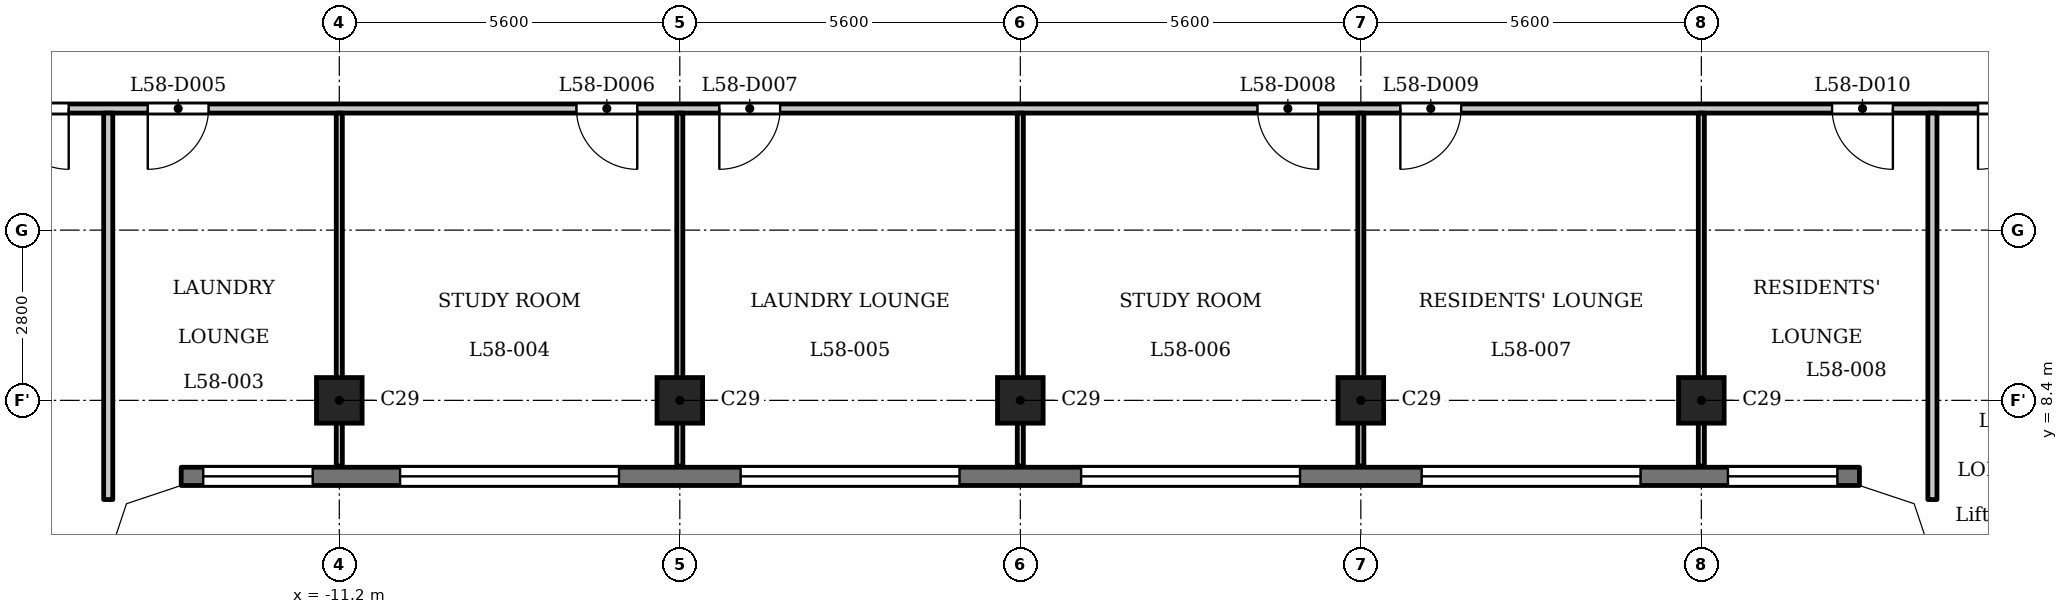
"""IFC4 building model, lengths in metres.
Left out: names, types, materials, properties, quantities, classifications, styles, units other than length and angle.
Written with IfcOpenShell. Run it as: python <this file> out.ifc"""

import sys

from ifc_helpers import new_model, si_unit, direction, frame, frame_2d, origin, origin_2d, place, context, subcontext, project, spatial, polyline, rectangle, outline, extrude, element, fill, save


model = new_model("IFC4")
c1 = context("Model", 3, precision=1e-05, world=origin(), true_north=direction((0.0, 1.0)))
c2 = subcontext(c1, "Body", "Model", "MODEL_VIEW")
j1 = project(units=[si_unit("LENGTHUNIT", "METRE"), si_unit("PLANEANGLEUNIT", "RADIAN")], contexts=[c1])
p1 = place(None, origin())
s1 = spatial("IfcSite", under=j1, at=p1, CompositionType="ELEMENT")
p2 = place(p1, origin())
s2 = spatial("IfcBuilding", under=s1, at=p2, CompositionType="ELEMENT")
p3 = place(p2, frame((0.0, 0.0, 223.9)))
s3 = spatial("IfcBuildingStorey", under=s2, at=p3, CompositionType="ELEMENT", Elevation=223.9)
for number, where, z_axis, x_axis in (
    (1, (-11.2, 8.4, 0.0), (0.0, 0.0, 1.0), (1.0, 0.0, 0.0)),
    (2, (-5.6, 8.4, 0.0), (0.0, 0.0, 1.0), (1.0, 0.0, 0.0)),
    (3, (0.0, 8.4, 0.0), (0.0, 0.0, 1.0), (1.0, 0.0, 0.0)),
    (4, (5.6, 8.4, 0.0), (0.0, 0.0, 1.0), (1.0, 0.0, 0.0)),
    (5, (11.2, 8.4, 0.0), (0.0, 0.0, 1.0), (1.0, 0.0, 0.0)),
):
    element("IfcColumn", number, at=place(p3, frame(where, z_axis=z_axis, x_axis=x_axis)), inside=s3, PredefinedType="COLUMN", context=c2, shape_type="SweptSolid", body=[
        extrude(rectangle(XDim=0.75, YDim=0.75, at=origin_2d()), origin(), (0.0, 0.0, 1.0), 3.5),
    ])
p4 = place(p3, frame((-13.8, 7.15, 0.0), z_axis=(0.0, 0.0, 1.0), x_axis=(1.0, 0.0, 0.0)))
e6 = element("IfcWall", 6, at=p4, inside=s3, PredefinedType="SOLIDWALL", context=c2, shape_type="SweptSolid", body=[
    extrude(rectangle(XDim=27.6, YDim=0.3, at=frame_2d((13.8, 0.0))), origin(), (0.0, 0.0, 1.0), 3.2),
])
p5 = place(p4, frame((0.363, 0.0, 0.9)))
e7 = element("IfcOpeningElement", 7, at=p5, cuts=e6, PredefinedType="OPENING", context=c2, shape_type="SweptSolid", body=[
    extrude(rectangle(XDim=1.8, YDim=1.25, at=frame_2d((0.9, 0.625))), frame((0.0, 0.16, 0.0), z_axis=(0.0, -1.0, 0.0), x_axis=(1.0, 0.0, 0.0)), (0.0, 0.0, 1.0), 0.32),
])
p6 = place(p4, frame((3.6, 0.0, 1.2)))
e8 = element("IfcOpeningElement", 8, at=p6, cuts=e6, PredefinedType="OPENING", context=c2, shape_type="SweptSolid", body=[
    extrude(rectangle(XDim=3.6, YDim=0.95, at=frame_2d((1.8, 0.475))), frame((0.0, 0.16, 0.0), z_axis=(0.0, -1.0, 0.0), x_axis=(1.0, 0.0, 0.0)), (0.0, 0.0, 1.0), 0.32),
])
p7 = place(p4, frame((9.2, 0.0, 1.2)))
e9 = element("IfcOpeningElement", 9, at=p7, cuts=e6, PredefinedType="OPENING", context=c2, shape_type="SweptSolid", body=[
    extrude(rectangle(XDim=3.6, YDim=0.95, at=frame_2d((1.8, 0.475))), frame((0.0, 0.16, 0.0), z_axis=(0.0, -1.0, 0.0), x_axis=(1.0, 0.0, 0.0)), (0.0, 0.0, 1.0), 0.32),
])
p8 = place(p4, frame((14.8, 0.0, 1.2)))
e10 = element("IfcOpeningElement", 10, at=p8, cuts=e6, PredefinedType="OPENING", context=c2, shape_type="SweptSolid", body=[
    extrude(rectangle(XDim=3.6, YDim=0.95, at=frame_2d((1.8, 0.475))), frame((0.0, 0.16, 0.0), z_axis=(0.0, -1.0, 0.0), x_axis=(1.0, 0.0, 0.0)), (0.0, 0.0, 1.0), 0.32),
])
p9 = place(p4, frame((20.4, 0.0, 1.2)))
e11 = element("IfcOpeningElement", 11, at=p9, cuts=e6, PredefinedType="OPENING", context=c2, shape_type="SweptSolid", body=[
    extrude(rectangle(XDim=3.6, YDim=0.95, at=frame_2d((1.8, 0.475))), frame((0.0, 0.16, 0.0), z_axis=(0.0, -1.0, 0.0), x_axis=(1.0, 0.0, 0.0)), (0.0, 0.0, 1.0), 0.32),
])
p10 = place(p4, frame((25.438, 0.0, 0.9)))
e12 = element("IfcOpeningElement", 12, at=p10, cuts=e6, PredefinedType="OPENING", context=c2, shape_type="SweptSolid", body=[
    extrude(rectangle(XDim=1.8, YDim=1.25, at=frame_2d((0.9, 0.625))), frame((0.0, 0.16, 0.0), z_axis=(0.0, -1.0, 0.0), x_axis=(1.0, 0.0, 0.0)), (0.0, 0.0, 1.0), 0.32),
])
p11 = place(p3, frame((-17.4, 13.2, 0.0), z_axis=(0.0, 0.0, 1.0), x_axis=(1.0, 0.0, 0.0)))
e13 = element("IfcWall", 13, at=p11, inside=s3, PredefinedType="PARTITIONING", context=c2, shape_type="SweptSolid", body=[
    extrude(rectangle(XDim=34.8, YDim=0.15, at=frame_2d((17.4, 0.0))), origin(), (0.0, 0.0, 1.0), 3.2),
])
p12 = place(p11, frame((0.75, 0.0, 0.0)))
e14 = element("IfcOpeningElement", 14, at=p12, cuts=e13, PredefinedType="OPENING", context=c2, shape_type="SweptSolid", body=[
    extrude(rectangle(XDim=1.0, YDim=2.1, at=frame_2d((0.5, 1.05))), frame((0.0, 0.085, 0.0), z_axis=(0.0, -1.0, 0.0), x_axis=(1.0, 0.0, 0.0)), (0.0, 0.0, 1.0), 0.17),
])
p13 = place(p11, frame((33.15, 0.0, 0.0)))
e15 = element("IfcOpeningElement", 15, at=p13, cuts=e13, PredefinedType="OPENING", context=c2, shape_type="SweptSolid", body=[
    extrude(rectangle(XDim=1.0, YDim=2.1, at=frame_2d((0.5, 1.05))), frame((0.0, 0.085, 0.0), z_axis=(0.0, -1.0, 0.0), x_axis=(1.0, 0.0, 0.0)), (0.0, 0.0, 1.0), 0.17),
])
p14 = place(p11, frame((3.05, 0.0, 0.0)))
e16 = element("IfcOpeningElement", 16, at=p14, cuts=e13, PredefinedType="OPENING", context=c2, shape_type="SweptSolid", body=[
    extrude(rectangle(XDim=1.0, YDim=2.1, at=frame_2d((0.5, 1.05))), frame((0.0, 0.085, 0.0), z_axis=(0.0, -1.0, 0.0), x_axis=(1.0, 0.0, 0.0)), (0.0, 0.0, 1.0), 0.17),
])
p15 = place(p11, frame((10.1, 0.0, 0.0)))
e17 = element("IfcOpeningElement", 17, at=p15, cuts=e13, PredefinedType="OPENING", context=c2, shape_type="SweptSolid", body=[
    extrude(rectangle(XDim=1.0, YDim=2.1, at=frame_2d((0.5, 1.05))), frame((0.0, 0.085, 0.0), z_axis=(0.0, -1.0, 0.0), x_axis=(1.0, 0.0, 0.0)), (0.0, 0.0, 1.0), 0.17),
])
p16 = place(p11, frame((12.45, 0.0, 0.0)))
e18 = element("IfcOpeningElement", 18, at=p16, cuts=e13, PredefinedType="OPENING", context=c2, shape_type="SweptSolid", body=[
    extrude(rectangle(XDim=1.0, YDim=2.1, at=frame_2d((0.5, 1.05))), frame((0.0, 0.085, 0.0), z_axis=(0.0, -1.0, 0.0), x_axis=(1.0, 0.0, 0.0)), (0.0, 0.0, 1.0), 0.17),
])
p17 = place(p11, frame((21.3, 0.0, 0.0)))
e19 = element("IfcOpeningElement", 19, at=p17, cuts=e13, PredefinedType="OPENING", context=c2, shape_type="SweptSolid", body=[
    extrude(rectangle(XDim=1.0, YDim=2.1, at=frame_2d((0.5, 1.05))), frame((0.0, 0.085, 0.0), z_axis=(0.0, -1.0, 0.0), x_axis=(1.0, 0.0, 0.0)), (0.0, 0.0, 1.0), 0.17),
])
p18 = place(p11, frame((23.65, 0.0, 0.0)))
e20 = element("IfcOpeningElement", 20, at=p18, cuts=e13, PredefinedType="OPENING", context=c2, shape_type="SweptSolid", body=[
    extrude(rectangle(XDim=1.0, YDim=2.1, at=frame_2d((0.5, 1.05))), frame((0.0, 0.085, 0.0), z_axis=(0.0, -1.0, 0.0), x_axis=(1.0, 0.0, 0.0)), (0.0, 0.0, 1.0), 0.17),
])
p19 = place(p11, frame((30.75, 0.0, 0.0)))
e21 = element("IfcOpeningElement", 21, at=p19, cuts=e13, PredefinedType="OPENING", context=c2, shape_type="SweptSolid", body=[
    extrude(rectangle(XDim=1.0, YDim=2.1, at=frame_2d((0.5, 1.05))), frame((0.0, 0.085, 0.0), z_axis=(0.0, -1.0, 0.0), x_axis=(1.0, 0.0, 0.0)), (0.0, 0.0, 1.0), 0.17),
])
p20 = place(p3, frame((-15.0, 6.769, 0.0), z_axis=(0.0, 0.0, 1.0), x_axis=(0.0, 1.0, 0.0)))
e22 = element("IfcWall", 22, at=p20, inside=s3, PredefinedType="PARTITIONING", context=c2, shape_type="SweptSolid", body=[
    extrude(rectangle(XDim=6.356, YDim=0.15, at=frame_2d((3.178, 0.0))), origin(), (0.0, 0.0, 1.0), 3.2),
])
for number, where, z_axis, x_axis in (
    (23, (-11.2, 7.32, 0.0), (0.0, 0.0, 1.0), (0.0, 1.0, 0.0)),
    (24, (-5.6, 7.32, 0.0), (0.0, 0.0, 1.0), (0.0, 1.0, 0.0)),
    (25, (0.0, 7.32, 0.0), (0.0, 0.0, 1.0), (0.0, 1.0, 0.0)),
    (26, (5.6, 7.32, 0.0), (0.0, 0.0, 1.0), (0.0, 1.0, 0.0)),
    (27, (11.2, 7.32, 0.0), (0.0, 0.0, 1.0), (0.0, 1.0, 0.0)),
):
    element("IfcWall", number, at=place(p3, frame(where, z_axis=z_axis, x_axis=x_axis)), inside=s3, PredefinedType="PARTITIONING", context=c2, shape_type="SweptSolid", body=[
        extrude(rectangle(XDim=5.805, YDim=0.1, at=frame_2d((2.902, 0.0))), origin(), (0.0, 0.0, 1.0), 3.2),
    ])
p21 = place(p3, frame((15.0, 6.769, 0.0), z_axis=(0.0, 0.0, 1.0), x_axis=(0.0, 1.0, 0.0)))
e28 = element("IfcWall", 28, at=p21, inside=s3, PredefinedType="PARTITIONING", context=c2, shape_type="SweptSolid", body=[
    extrude(rectangle(XDim=6.356, YDim=0.15, at=frame_2d((3.178, 0.0))), origin(), (0.0, 0.0, 1.0), 3.2),
])
p22 = place(p3, origin())
e29 = element("IfcWall", 29, at=p22, inside=s3, PredefinedType="SOLIDWALL", context=c2, shape_type="SweptSolid", body=[
    extrude(outline(polyline([(-13.849, 7.3), (-14.937, 6.937), (-15.3, 5.849), (-15.3, 5.8), (-15.0, 5.8), (-14.7, 6.7), (-13.8, 7.0), (-13.8, 7.3), (-13.849, 7.3)])), origin(), (0.0, 0.0, 1.0), 3.2),
])
e30 = element("IfcWall", 30, at=p22, inside=s3, PredefinedType="SOLIDWALL", context=c2, shape_type="SweptSolid", body=[
    extrude(outline(polyline([(14.937, 6.937), (13.849, 7.3), (13.8, 7.3), (13.8, 7.0), (14.7, 6.7), (15.0, 5.8), (15.3, 5.8), (15.3, 5.849), (14.937, 6.937)])), origin(), (0.0, 0.0, 1.0), 3.2),
])
p23 = place(p12, origin())
e31 = element("IfcDoor", 31, at=p23, inside=s3, OperationType="SINGLE_SWING_RIGHT", PredefinedType="DOOR", context=c2, shape_type="SweptSolid", body=[
    extrude(rectangle(XDim=1.0, YDim=2.1, at=frame_2d((0.5, 1.05))), frame((0.0, 0.025, 0.0), z_axis=(0.0, -1.0, 0.0), x_axis=(1.0, 0.0, 0.0)), (0.0, 0.0, 1.0), 0.05),
])
fill(e14, e31)
p24 = place(p13, origin())
e32 = element("IfcDoor", 32, at=p24, inside=s3, OperationType="SINGLE_SWING_LEFT", PredefinedType="DOOR", context=c2, shape_type="SweptSolid", body=[
    extrude(rectangle(XDim=1.0, YDim=2.1, at=frame_2d((0.5, 1.05))), frame((0.0, 0.025, 0.0), z_axis=(0.0, -1.0, 0.0), x_axis=(1.0, 0.0, 0.0)), (0.0, 0.0, 1.0), 0.05),
])
fill(e15, e32)
p25 = place(p14, origin())
e33 = element("IfcDoor", 33, at=p25, inside=s3, OperationType="SINGLE_SWING_LEFT", PredefinedType="DOOR", context=c2, shape_type="SweptSolid", body=[
    extrude(rectangle(XDim=1.0, YDim=2.1, at=frame_2d((0.5, 1.05))), frame((0.0, 0.025, 0.0), z_axis=(0.0, -1.0, 0.0), x_axis=(1.0, 0.0, 0.0)), (0.0, 0.0, 1.0), 0.05),
])
fill(e16, e33)
p26 = place(p15, origin())
e34 = element("IfcDoor", 34, at=p26, inside=s3, OperationType="SINGLE_SWING_RIGHT", PredefinedType="DOOR", context=c2, shape_type="SweptSolid", body=[
    extrude(rectangle(XDim=1.0, YDim=2.1, at=frame_2d((0.5, 1.05))), frame((0.0, 0.025, 0.0), z_axis=(0.0, -1.0, 0.0), x_axis=(1.0, 0.0, 0.0)), (0.0, 0.0, 1.0), 0.05),
])
fill(e17, e34)
p27 = place(p16, origin())
e35 = element("IfcDoor", 35, at=p27, inside=s3, OperationType="SINGLE_SWING_LEFT", PredefinedType="DOOR", context=c2, shape_type="SweptSolid", body=[
    extrude(rectangle(XDim=1.0, YDim=2.1, at=frame_2d((0.5, 1.05))), frame((0.0, 0.025, 0.0), z_axis=(0.0, -1.0, 0.0), x_axis=(1.0, 0.0, 0.0)), (0.0, 0.0, 1.0), 0.05),
])
fill(e18, e35)
p28 = place(p17, origin())
e36 = element("IfcDoor", 36, at=p28, inside=s3, OperationType="SINGLE_SWING_RIGHT", PredefinedType="DOOR", context=c2, shape_type="SweptSolid", body=[
    extrude(rectangle(XDim=1.0, YDim=2.1, at=frame_2d((0.5, 1.05))), frame((0.0, 0.025, 0.0), z_axis=(0.0, -1.0, 0.0), x_axis=(1.0, 0.0, 0.0)), (0.0, 0.0, 1.0), 0.05),
])
fill(e19, e36)
p29 = place(p18, origin())
e37 = element("IfcDoor", 37, at=p29, inside=s3, OperationType="SINGLE_SWING_LEFT", PredefinedType="DOOR", context=c2, shape_type="SweptSolid", body=[
    extrude(rectangle(XDim=1.0, YDim=2.1, at=frame_2d((0.5, 1.05))), frame((0.0, 0.025, 0.0), z_axis=(0.0, -1.0, 0.0), x_axis=(1.0, 0.0, 0.0)), (0.0, 0.0, 1.0), 0.05),
])
fill(e20, e37)
p30 = place(p19, origin())
e38 = element("IfcDoor", 38, at=p30, inside=s3, OperationType="SINGLE_SWING_RIGHT", PredefinedType="DOOR", context=c2, shape_type="SweptSolid", body=[
    extrude(rectangle(XDim=1.0, YDim=2.1, at=frame_2d((0.5, 1.05))), frame((0.0, 0.025, 0.0), z_axis=(0.0, -1.0, 0.0), x_axis=(1.0, 0.0, 0.0)), (0.0, 0.0, 1.0), 0.05),
])
fill(e21, e38)
p31 = place(p5, origin())
e39 = element("IfcWindow", 39, at=p31, inside=s3, PartitioningType="SINGLE_PANEL", PredefinedType="WINDOW", context=c2, shape_type="SweptSolid", body=[
    extrude(rectangle(XDim=1.8, YDim=1.25, at=frame_2d((0.9, 0.625))), frame((0.0, 0.03, 0.0), z_axis=(0.0, -1.0, 0.0), x_axis=(1.0, 0.0, 0.0)), (0.0, 0.0, 1.0), 0.06),
])
fill(e7, e39)
p32 = place(p6, origin())
e40 = element("IfcWindow", 40, at=p32, inside=s3, PartitioningType="SINGLE_PANEL", PredefinedType="WINDOW", context=c2, shape_type="SweptSolid", body=[
    extrude(rectangle(XDim=3.6, YDim=0.95, at=frame_2d((1.8, 0.475))), frame((0.0, 0.03, 0.0), z_axis=(0.0, -1.0, 0.0), x_axis=(1.0, 0.0, 0.0)), (0.0, 0.0, 1.0), 0.06),
])
fill(e8, e40)
p33 = place(p7, origin())
e41 = element("IfcWindow", 41, at=p33, inside=s3, PartitioningType="SINGLE_PANEL", PredefinedType="WINDOW", context=c2, shape_type="SweptSolid", body=[
    extrude(rectangle(XDim=3.6, YDim=0.95, at=frame_2d((1.8, 0.475))), frame((0.0, 0.03, 0.0), z_axis=(0.0, -1.0, 0.0), x_axis=(1.0, 0.0, 0.0)), (0.0, 0.0, 1.0), 0.06),
])
fill(e9, e41)
p34 = place(p8, origin())
e42 = element("IfcWindow", 42, at=p34, inside=s3, PartitioningType="SINGLE_PANEL", PredefinedType="WINDOW", context=c2, shape_type="SweptSolid", body=[
    extrude(rectangle(XDim=3.6, YDim=0.95, at=frame_2d((1.8, 0.475))), frame((0.0, 0.03, 0.0), z_axis=(0.0, -1.0, 0.0), x_axis=(1.0, 0.0, 0.0)), (0.0, 0.0, 1.0), 0.06),
])
fill(e10, e42)
p35 = place(p9, origin())
e43 = element("IfcWindow", 43, at=p35, inside=s3, PartitioningType="SINGLE_PANEL", PredefinedType="WINDOW", context=c2, shape_type="SweptSolid", body=[
    extrude(rectangle(XDim=3.6, YDim=0.95, at=frame_2d((1.8, 0.475))), frame((0.0, 0.03, 0.0), z_axis=(0.0, -1.0, 0.0), x_axis=(1.0, 0.0, 0.0)), (0.0, 0.0, 1.0), 0.06),
])
fill(e11, e43)
p36 = place(p10, origin())
e44 = element("IfcWindow", 44, at=p36, inside=s3, PartitioningType="SINGLE_PANEL", PredefinedType="WINDOW", context=c2, shape_type="SweptSolid", body=[
    extrude(rectangle(XDim=1.8, YDim=1.25, at=frame_2d((0.9, 0.625))), frame((0.0, 0.03, 0.0), z_axis=(0.0, -1.0, 0.0), x_axis=(1.0, 0.0, 0.0)), (0.0, 0.0, 1.0), 0.06),
])
fill(e12, e44)
save(model, sys.argv[1])
